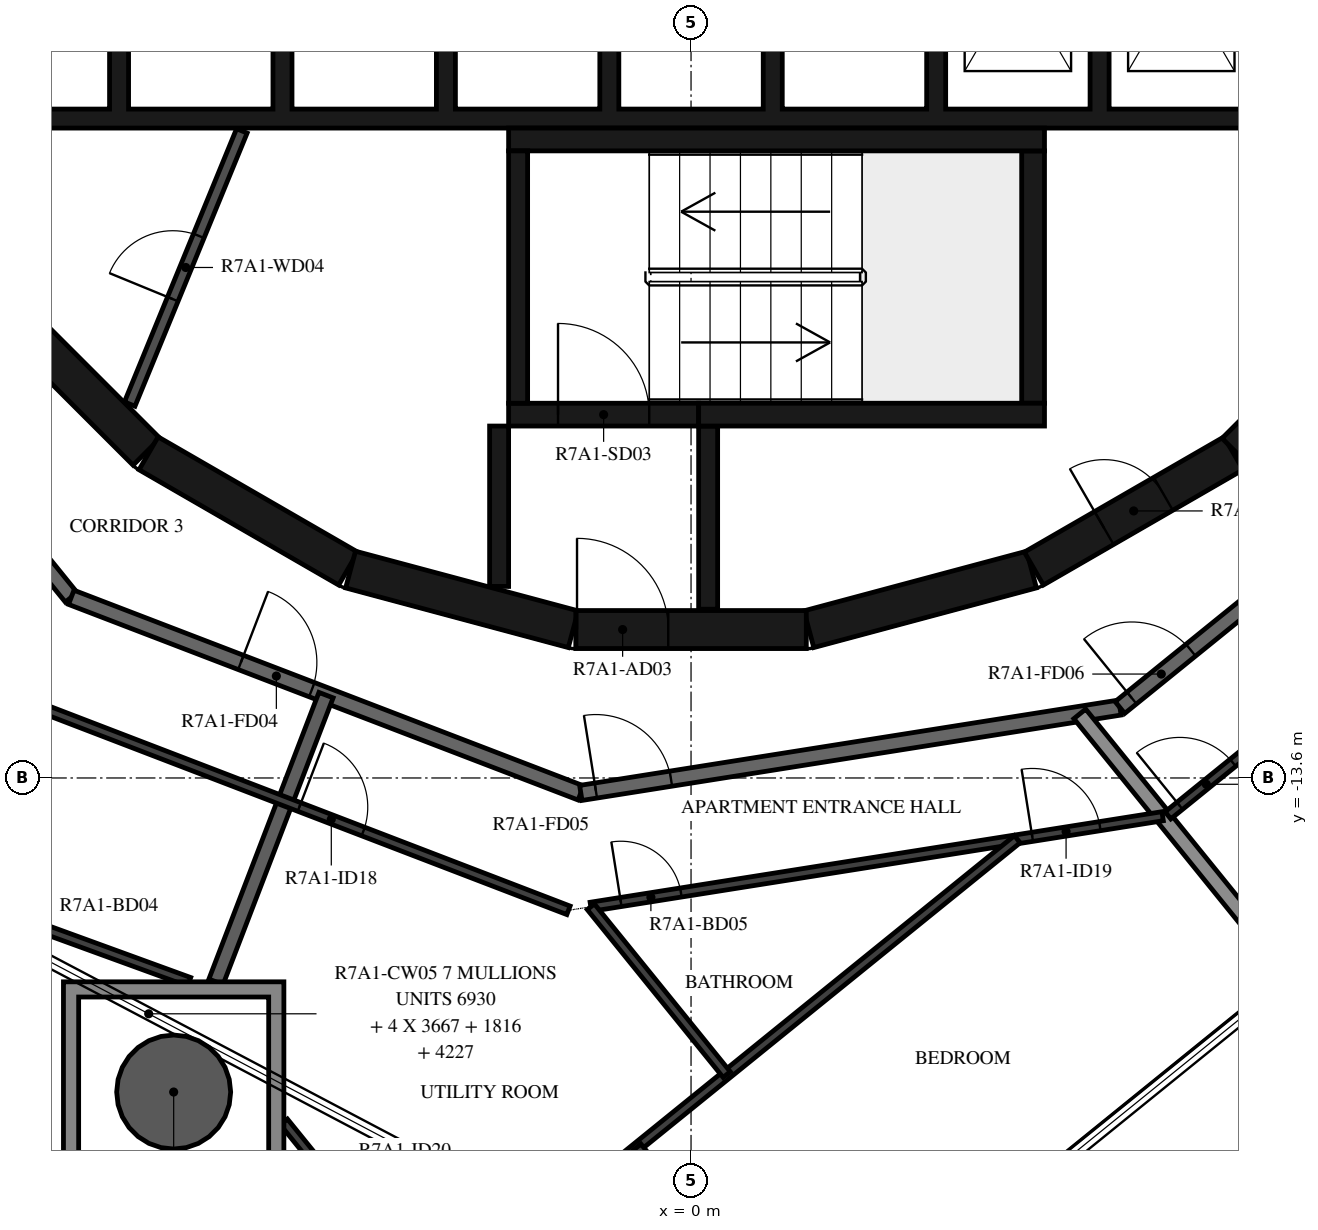
"""IFC4 building model, lengths in metres.
Left out: names, types, materials, properties, quantities, classifications, styles, units other than length and angle.
Written with IfcOpenShell. Run it as: python <this file> out.ifc"""

import sys

from ifc_helpers import new_model, si_unit, direction, frame, frame_2d, origin, origin_2d, place, context, subcontext, project, spatial, polyline, rectangle, hollow_circle, outline, extrude, element, fill, save


model = new_model("IFC4")
c1 = context("Model", 3, precision=1e-05, world=origin(), true_north=direction((0.0, 1.0)))
c2 = subcontext(c1, "Body", "Model", "MODEL_VIEW")
j1 = project(units=[si_unit("LENGTHUNIT", "METRE"), si_unit("PLANEANGLEUNIT", "RADIAN")], contexts=[c1])
p1 = place(None, origin())
s1 = spatial("IfcSite", under=j1, at=p1, CompositionType="ELEMENT")
p2 = place(p1, origin())
s2 = spatial("IfcBuilding", under=s1, at=p2, CompositionType="ELEMENT")
p3 = place(p2, frame((0.0, 0.0, 266.9)))
s3 = spatial("IfcBuildingStorey", under=s2, at=p3, CompositionType="ELEMENT", Elevation=266.9)
p4 = place(p3, frame((-6.807, -17.732, -0.38), z_axis=(0.0, 0.0, 1.0), x_axis=(1.0, 0.0, 0.0)))
e1 = element("IfcColumn", 1, at=p4, inside=s3, PredefinedType="COLUMN", context=c2, shape_type="SweptSolid", body=[
    extrude(hollow_circle(Radius=0.75, WallThickness=0.035, at=origin_2d()), origin(), (0.0, 0.0, 1.0), 3.5),
])
p5 = place(p3, frame((1.55, -11.643, 0.0), z_axis=(0.0, 0.0, 1.0), x_axis=(0.965948410781, 0.258734743916, 0.0)))
e2 = element("IfcWall", 2, at=p5, inside=s3, PredefinedType="SHEAR", context=c2, shape_type="SweptSolid", body=[
    extrude(rectangle(XDim=3.033, YDim=0.5, at=frame_2d((1.516, 0.0))), origin(), (0.0, 0.0, 1.0), 3.12),
])
p6 = place(p3, frame((4.51, -10.845, 0.0), z_axis=(0.0, 0.0, 1.0), x_axis=(0.865975092491, 0.500087131594, 0.0)))
e3 = element("IfcWall", 3, at=p6, inside=s3, PredefinedType="SHEAR", context=c2, shape_type="SweptSolid", body=[
    extrude(rectangle(XDim=3.033, YDim=0.5, at=frame_2d((1.516, 0.0))), origin(), (0.0, 0.0, 1.0), 3.12),
])
p7 = place(p6, frame((1.066, 0.0, 0.0)))
e4 = element("IfcOpeningElement", 4, at=p7, cuts=e3, PredefinedType="OPENING", context=c2, shape_type="SweptSolid", body=[
    extrude(rectangle(XDim=0.9, YDim=2.1, at=frame_2d((0.45, 1.05))), frame((0.0, 0.26, 0.0), z_axis=(0.0, -1.0, 0.0), x_axis=(1.0, 0.0, 0.0)), (0.0, 0.0, 1.0), 0.52),
])
for number, where, z_axis, x_axis in (
    (5, (7.164, -9.308, 0.0), (0.0, 0.0, 1.0), (0.707, 0.707, 0.0)),
    (6, (-9.308, -7.164, 0.0), (0.0, 0.0, 1.0), (0.707, -0.707, 0.0)),
):
    element("IfcWall", number, at=place(p3, frame(where, z_axis=z_axis, x_axis=x_axis)), inside=s3, PredefinedType="SHEAR", context=c2, shape_type="SweptSolid", body=[
        extrude(rectangle(XDim=3.032, YDim=0.5, at=frame_2d((1.516, 0.0))), origin(), (0.0, 0.0, 1.0), 3.12),
    ])
for number, where, z_axis, x_axis in (
    (7, (-7.137, -9.329, 0.0), (0.0, 0.0, 1.0), (0.866, -0.5, 0.0)),
    (8, (-4.479, -10.858, 0.0), (0.0, 0.0, 1.0), (0.966, -0.259, 0.0)),
):
    element("IfcWall", number, at=place(p3, frame(where, z_axis=z_axis, x_axis=x_axis)), inside=s3, PredefinedType="SHEAR", context=c2, shape_type="SweptSolid", body=[
        extrude(rectangle(XDim=3.033, YDim=0.5, at=frame_2d((1.516, 0.0))), origin(), (0.0, 0.0, 1.0), 3.12),
    ])
p8 = place(p3, frame((-1.516, -11.647, 0.0), z_axis=(0.0, 0.0, 1.0), x_axis=(1.0, 0.0, 0.0)))
e9 = element("IfcWall", 9, at=p8, inside=s3, PredefinedType="SHEAR", context=c2, shape_type="SweptSolid", body=[
    extrude(rectangle(XDim=3.033, YDim=0.5, at=frame_2d((1.516, 0.0))), origin(), (0.0, 0.0, 1.0), 3.12),
])
p9 = place(p8, frame((0.016, 0.0, 0.0)))
e10 = element("IfcOpeningElement", 10, at=p9, cuts=e9, PredefinedType="OPENING", context=c2, shape_type="SweptSolid", body=[
    extrude(rectangle(XDim=1.2, YDim=2.1, at=frame_2d((0.6, 1.05))), frame((0.0, 0.26, 0.0), z_axis=(0.0, -1.0, 0.0), x_axis=(1.0, 0.0, 0.0)), (0.0, 0.0, 1.0), 0.52),
])
p10 = place(p3, frame((-2.275, -8.67, 0.0), z_axis=(0.0, 0.0, 1.0), x_axis=(0.0, 1.0, 0.0)))
e11 = element("IfcWall", 11, at=p10, inside=s3, PredefinedType="SHEAR", context=c2, shape_type="SweptSolid", body=[
    extrude(rectangle(XDim=3.32, YDim=0.25, at=frame_2d((1.66, 0.0))), origin(), (0.0, 0.0, 1.0), 3.12),
])
p11 = place(p3, frame((-2.4, -5.2, 0.0), z_axis=(0.0, 0.0, 1.0), x_axis=(1.0, 0.0, 0.0)))
e12 = element("IfcWall", 12, at=p11, inside=s3, PredefinedType="SHEAR", context=c2, shape_type="SweptSolid", body=[
    extrude(rectangle(XDim=7.05, YDim=0.3, at=frame_2d((3.525, 0.0))), origin(), (0.0, 0.0, 1.0), 3.12),
])
p12 = place(p3, frame((4.5, -8.67, 0.0), z_axis=(0.0, 0.0, 1.0), x_axis=(0.0, 1.0, 0.0)))
e13 = element("IfcWall", 13, at=p12, inside=s3, PredefinedType="SHEAR", context=c2, shape_type="SweptSolid", body=[
    extrude(rectangle(XDim=3.32, YDim=0.3, at=frame_2d((1.66, 0.0))), origin(), (0.0, 0.0, 1.0), 3.12),
])
p13 = place(p3, frame((0.1, -8.82, 0.0), z_axis=(0.0, 0.0, 1.0), x_axis=(1.0, 0.0, 0.0)))
e14 = element("IfcWall", 14, at=p13, inside=s3, PredefinedType="SHEAR", context=c2, shape_type="SweptSolid", body=[
    extrude(rectangle(XDim=4.55, YDim=0.3, at=frame_2d((2.275, 0.0))), origin(), (0.0, 0.0, 1.0), 3.12),
])
p14 = place(p3, frame((-2.4, -8.82, 0.0), z_axis=(0.0, 0.0, 1.0), x_axis=(1.0, 0.0, 0.0)))
e15 = element("IfcWall", 15, at=p14, inside=s3, PredefinedType="SHEAR", context=c2, shape_type="SweptSolid", body=[
    extrude(rectangle(XDim=2.5, YDim=0.3, at=frame_2d((1.25, 0.0))), origin(), (0.0, 0.0, 1.0), 3.12),
])
p15 = place(p14, frame((0.65, 0.0, 0.0)))
e16 = element("IfcOpeningElement", 16, at=p15, cuts=e15, PredefinedType="OPENING", context=c2, shape_type="SweptSolid", body=[
    extrude(rectangle(XDim=1.2, YDim=2.1, at=frame_2d((0.6, 1.05))), frame((0.0, 0.16, 0.0), z_axis=(0.0, -1.0, 0.0), x_axis=(1.0, 0.0, 0.0)), (0.0, 0.0, 1.0), 0.32),
])
p16 = place(p3, frame((-2.525, -8.97, 0.0), z_axis=(0.0, 0.0, 1.0), x_axis=(0.0, -1.0, 0.0)))
e17 = element("IfcWall", 17, at=p16, inside=s3, PredefinedType="SHEAR", context=c2, shape_type="SweptSolid", body=[
    extrude(rectangle(XDim=2.11, YDim=0.25, at=frame_2d((1.055, 0.0))), origin(), (0.0, 0.0, 1.0), 3.12),
])
p17 = place(p3, frame((0.225, -8.97, 0.0), z_axis=(0.0, 0.0, 1.0), x_axis=(0.0, -1.0, 0.0)))
e18 = element("IfcWall", 18, at=p17, inside=s3, PredefinedType="SHEAR", context=c2, shape_type="SweptSolid", body=[
    extrude(rectangle(XDim=2.41, YDim=0.25, at=frame_2d((1.205, 0.0))), origin(), (0.0, 0.0, 1.0), 3.12),
])
p18 = place(p3, origin())
e19 = element("IfcWall", 19, at=p18, inside=s3, PredefinedType="SHEAR", context=c2, shape_type="SweptSolid", body=[
    extrude(outline(polyline([(9.8, -5.05), (9.8, -4.8), (9.8, -1.9), (9.55, -1.9), (9.55, -4.8), (7.65, -4.8), (7.65, -1.9), (7.4, -1.9), (7.4, -4.8), (5.5, -4.8), (5.5, -1.9), (5.25, -1.9), (5.25, -4.8), (3.35, -4.8), (3.35, -1.9), (3.1, -1.9), (3.1, -4.8), (1.2, -4.8), (1.2, -1.9), (0.95, -1.9), (0.95, -4.8), (-0.95, -4.8), (-0.95, -1.9), (-1.2, -1.9), (-1.2, -4.8), (-3.1, -4.8), (-3.1, -1.9), (-3.35, -1.9), (-3.35, -4.8), (-5.25, -4.8), (-5.25, -1.9), (-5.5, -1.9), (-5.5, -4.8), (-7.4, -4.8), (-7.4, -1.9), (-7.65, -1.9), (-7.65, -4.8), (-9.55, -4.8), (-9.55, -1.9), (-9.8, -1.9), (-9.8, -4.8), (-9.8, -5.05), (9.8, -5.05)])), origin(), (0.0, 0.0, 1.0), 3.12),
])
p19 = place(p3, frame((-7.385, -8.681, 0.0), z_axis=(0.0, 0.0, 1.0), x_axis=(0.379804590409, 0.925066739811, 0.0)))
e20 = element("IfcWall", 20, at=p19, inside=s3, PredefinedType="PARTITIONING", context=c2, shape_type="SweptSolid", body=[
    extrude(rectangle(XDim=3.885, YDim=0.15, at=frame_2d((1.942, 0.0))), origin(), (0.0, 0.0, 1.0), 3.12),
])
p20 = place(p19, frame((1.493, 0.0, 0.0)))
e21 = element("IfcOpeningElement", 21, at=p20, cuts=e20, PredefinedType="OPENING", context=c2, shape_type="SweptSolid", body=[
    extrude(rectangle(XDim=0.9, YDim=2.1, at=frame_2d((0.45, 1.05))), frame((0.0, 0.085, 0.0), z_axis=(0.0, -1.0, 0.0), x_axis=(1.0, 0.0, 0.0)), (0.0, 0.0, 1.0), 0.17),
])
p21 = place(p3, frame((-12.673, -5.643, 0.0), z_axis=(0.0, 0.0, 1.0), x_axis=(0.629302871585, -0.777160148113, 0.0)))
e22 = element("IfcWall", 22, at=p21, inside=s3, PredefinedType="STANDARD", context=c2, shape_type="SweptSolid", body=[
    extrude(rectangle(XDim=7.181, YDim=0.2, at=frame_2d((3.59, 0.0))), origin(), (0.0, 0.0, 1.0), 3.12),
])
p22 = place(p3, frame((-8.154, -11.223, 0.0), z_axis=(0.0, 0.0, 1.0), x_axis=(0.93359073609, -0.358341090983, 0.0)))
e23 = element("IfcWall", 23, at=p22, inside=s3, PredefinedType="STANDARD", context=c2, shape_type="SweptSolid", body=[
    extrude(rectangle(XDim=7.181, YDim=0.2, at=frame_2d((3.59, 0.0))), origin(), (0.0, 0.0, 1.0), 3.12),
])
p23 = place(p22, frame((2.39, 0.0, 0.0)))
e24 = element("IfcOpeningElement", 24, at=p23, cuts=e23, PredefinedType="OPENING", context=c2, shape_type="SweptSolid", body=[
    extrude(rectangle(XDim=1.0, YDim=2.1, at=frame_2d((0.5, 1.05))), frame((0.0, 0.11, 0.0), z_axis=(0.0, -1.0, 0.0), x_axis=(1.0, 0.0, 0.0)), (0.0, 0.0, 1.0), 0.22),
])
p24 = place(p3, frame((-1.45, -13.797, 0.0), z_axis=(0.0, 0.0, 1.0), x_axis=(0.987690361611, 0.156421704315, 0.0)))
e25 = element("IfcWall", 25, at=p24, inside=s3, PredefinedType="STANDARD", context=c2, shape_type="SweptSolid", body=[
    extrude(rectangle(XDim=7.181, YDim=0.2, at=frame_2d((3.591, 0.0))), origin(), (0.0, 0.0, 1.0), 3.12),
])
p25 = place(p24, frame((0.2, 0.0, 0.0)))
e26 = element("IfcOpeningElement", 26, at=p25, cuts=e25, PredefinedType="OPENING", context=c2, shape_type="SweptSolid", body=[
    extrude(rectangle(XDim=1.0, YDim=2.1, at=frame_2d((0.5, 1.05))), frame((0.0, 0.11, 0.0), z_axis=(0.0, -1.0, 0.0), x_axis=(1.0, 0.0, 0.0)), (0.0, 0.0, 1.0), 0.22),
])
p26 = place(p3, frame((5.643, -12.673, 0.0), z_axis=(0.0, 0.0, 1.0), x_axis=(0.777160148113, 0.629302871585, 0.0)))
e27 = element("IfcWall", 27, at=p26, inside=s3, PredefinedType="STANDARD", context=c2, shape_type="SweptSolid", body=[
    extrude(rectangle(XDim=7.181, YDim=0.2, at=frame_2d((3.59, 0.0))), origin(), (0.0, 0.0, 1.0), 3.12),
])
p27 = place(p26, frame((0.2, 0.0, 0.0)))
e28 = element("IfcOpeningElement", 28, at=p27, cuts=e27, PredefinedType="OPENING", context=c2, shape_type="SweptSolid", body=[
    extrude(rectangle(XDim=1.0, YDim=2.1, at=frame_2d((0.5, 1.05))), frame((0.0, 0.11, 0.0), z_axis=(0.0, -1.0, 0.0), x_axis=(1.0, 0.0, 0.0)), (0.0, 0.0, 1.0), 0.22),
])
p28 = place(p3, frame((-6.25, -16.282, 0.0), z_axis=(0.0, 0.0, 1.0), x_axis=(0.358351333512, 0.933586804625, 0.0)))
e29 = element("IfcWall", 29, at=p28, inside=s3, PredefinedType="STANDARD", context=c2, shape_type="SweptSolid", body=[
    extrude(rectangle(XDim=4.04, YDim=0.2, at=frame_2d((2.02, 0.0))), origin(), (0.0, 0.0, 1.0), 3.12),
])
p29 = place(p3, frame((7.861, -16.148, 0.0), z_axis=(0.0, 0.0, 1.0), x_axis=(-0.629330189513, 0.777138026716, 0.0)))
e30 = element("IfcWall", 30, at=p29, inside=s3, PredefinedType="STANDARD", context=c2, shape_type="SweptSolid", body=[
    extrude(rectangle(XDim=4.364, YDim=0.2, at=frame_2d((2.182, 0.0))), origin(), (0.0, 0.0, 1.0), 2.73),
])
p30 = place(p3, frame((-9.067, -12.479, 0.0), z_axis=(0.0, 0.0, 1.0), x_axis=(0.933579449035, -0.358370495911, 0.0)))
e31 = element("IfcWall", 31, at=p30, inside=s3, PredefinedType="PARTITIONING", context=c2, shape_type="SweptSolid", body=[
    extrude(rectangle(XDim=7.985, YDim=0.12, at=frame_2d((3.992, 0.0))), origin(), (0.0, 0.0, 1.0), 3.12),
])
p31 = place(p30, frame((4.192, 0.0, 0.0)))
e32 = element("IfcOpeningElement", 32, at=p31, cuts=e31, PredefinedType="OPENING", context=c2, shape_type="SweptSolid", body=[
    extrude(rectangle(XDim=0.9, YDim=2.1, at=frame_2d((0.45, 1.05))), frame((0.0, 0.07, 0.0), z_axis=(0.0, -1.0, 0.0), x_axis=(1.0, 0.0, 0.0)), (0.0, 0.0, 1.0), 0.14),
])
p32 = place(p3, frame((-10.071, -15.019, 0.0), z_axis=(0.0, 0.0, 1.0), x_axis=(0.939648507355, -0.34214131967, 0.0)))
e33 = element("IfcWall", 33, at=p32, inside=s3, PredefinedType="PARTITIONING", context=c2, shape_type="SweptSolid", body=[
    extrude(rectangle(XDim=3.691, YDim=0.12, at=frame_2d((1.846, 0.0))), origin(), (0.0, 0.0, 1.0), 3.12),
])
p33 = place(p32, frame((0.4, 0.0, 0.0)))
e34 = element("IfcOpeningElement", 34, at=p33, cuts=e33, PredefinedType="OPENING", context=c2, shape_type="SweptSolid", body=[
    extrude(rectangle(XDim=0.8, YDim=2.1, at=frame_2d((0.4, 1.05))), frame((0.0, 0.07, 0.0), z_axis=(0.0, -1.0, 0.0), x_axis=(1.0, 0.0, 0.0)), (0.0, 0.0, 1.0), 0.14),
])
p34 = place(p3, frame((-1.318, -15.294, 0.0), z_axis=(0.0, 0.0, 1.0), x_axis=(0.987689040792, 0.156430044108, 0.0)))
e35 = element("IfcWall", 35, at=p34, inside=s3, PredefinedType="PARTITIONING", context=c2, shape_type="SweptSolid", body=[
    extrude(rectangle(XDim=7.616, YDim=0.12, at=frame_2d((3.808, 0.0))), origin(), (0.0, 0.0, 1.0), 3.12),
])
p35 = place(p34, frame((0.4, 0.0, 0.0)))
e36 = element("IfcOpeningElement", 36, at=p35, cuts=e35, PredefinedType="OPENING", context=c2, shape_type="SweptSolid", body=[
    extrude(rectangle(XDim=0.8, YDim=2.1, at=frame_2d((0.4, 1.05))), frame((0.0, 0.07, 0.0), z_axis=(0.0, -1.0, 0.0), x_axis=(1.0, 0.0, 0.0)), (0.0, 0.0, 1.0), 0.14),
])
p36 = place(p34, frame((5.88, 0.0, 0.0)))
e37 = element("IfcOpeningElement", 37, at=p36, cuts=e35, PredefinedType="OPENING", context=c2, shape_type="SweptSolid", body=[
    extrude(rectangle(XDim=0.9, YDim=2.1, at=frame_2d((0.45, 1.05))), frame((0.0, 0.07, 0.0), z_axis=(0.0, -1.0, 0.0), x_axis=(1.0, 0.0, 0.0)), (0.0, 0.0, 1.0), 0.14),
])
p37 = place(p3, frame((-3.354, -20.597, 0.0), z_axis=(0.0, 0.0, 1.0), x_axis=(-0.629352711751, 0.777119787556, 0.0)))
e38 = element("IfcWall", 38, at=p37, inside=s3, PredefinedType="PARTITIONING", context=c2, shape_type="SweptSolid", body=[
    extrude(rectangle(XDim=3.182, YDim=0.12, at=frame_2d((1.591, 0.0))), origin(), (0.0, 0.0, 1.0), 3.12),
])
p38 = place(p37, frame((0.2, 0.0, 0.0)))
e39 = element("IfcOpeningElement", 39, at=p38, cuts=e38, PredefinedType="OPENING", context=c2, shape_type="SweptSolid", body=[
    extrude(rectangle(XDim=0.9, YDim=2.1, at=frame_2d((0.45, 1.05))), frame((0.0, 0.07, 0.0), z_axis=(0.0, -1.0, 0.0), x_axis=(1.0, 0.0, 0.0)), (0.0, 0.0, 1.0), 0.14),
])
p39 = place(p3, frame((-3.875, -21.019, 0.0), z_axis=(0.0, 0.0, 1.0), x_axis=(0.777149096542, 0.629316519523, 0.0)))
e40 = element("IfcWall", 40, at=p39, inside=s3, PredefinedType="PARTITIONING", context=c2, shape_type="SweptSolid", body=[
    extrude(rectangle(XDim=10.508, YDim=0.12, at=frame_2d((5.254, 0.0))), origin(), (0.0, 0.0, 1.0), 3.12),
])
p40 = place(p39, frame((1.23, 0.0, 0.0)))
e41 = element("IfcOpeningElement", 41, at=p40, cuts=e40, PredefinedType="OPENING", context=c2, shape_type="SweptSolid", body=[
    extrude(rectangle(XDim=0.9, YDim=2.1, at=frame_2d((0.45, 1.05))), frame((0.0, 0.07, 0.0), z_axis=(0.0, -1.0, 0.0), x_axis=(1.0, 0.0, 0.0)), (0.0, 0.0, 1.0), 0.14),
])
p41 = place(p3, frame((0.469, -17.502, 0.0), z_axis=(0.0, 0.0, 1.0), x_axis=(-0.629307025607, 0.777156784389, 0.0)))
e42 = element("IfcWall", 42, at=p41, inside=s3, PredefinedType="PARTITIONING", context=c2, shape_type="SweptSolid", body=[
    extrude(rectangle(XDim=2.84, YDim=0.12, at=frame_2d((1.42, 0.0))), origin(), (0.0, 0.0, 1.0), 3.12),
])
p42 = place(p3, frame((1.56, -21.251, 0.0), z_axis=(0.0, 0.0, 1.0), x_axis=(-0.62934843781, 0.7771232488, 0.0)))
e43 = element("IfcWall", 43, at=p42, inside=s3, PredefinedType="PARTITIONING", context=c2, shape_type="SweptSolid", body=[
    extrude(rectangle(XDim=3.6, YDim=0.12, at=frame_2d((1.8, 0.0))), origin(), (0.0, 0.0, 1.0), 2.73),
])
p43 = place(p3, frame((6.274, -14.092, 0.0), z_axis=(0.0, 0.0, 1.0), x_axis=(0.777135206268, 0.62933367237, 0.0)))
e44 = element("IfcWall", 44, at=p43, inside=s3, PredefinedType="PARTITIONING", context=c2, shape_type="SweptSolid", body=[
    extrude(rectangle(XDim=7.985, YDim=0.12, at=frame_2d((3.992, 0.0))), origin(), (0.0, 0.0, 1.0), 3.12),
])
p44 = place(p43, frame((0.2, 0.0, 0.0)))
e45 = element("IfcOpeningElement", 45, at=p44, cuts=e44, PredefinedType="OPENING", context=c2, shape_type="SweptSolid", body=[
    extrude(rectangle(XDim=0.9, YDim=2.1, at=frame_2d((0.45, 1.05))), frame((0.0, 0.07, 0.0), z_axis=(0.0, -1.0, 0.0), x_axis=(1.0, 0.0, 0.0)), (0.0, 0.0, 1.0), 0.14),
])
p45 = place(p3, origin())
e46 = element("IfcWall", 46, at=p45, inside=s3, PredefinedType="STANDARD", context=c2, shape_type="SweptSolid", body=[
    extrude(outline(polyline([(-5.357, -16.282), (-5.357, -19.182), (-8.257, -19.182), (-8.257, -16.282), (-5.357, -16.282)]), holes=[polyline([(-8.057, -18.982), (-5.557, -18.982), (-5.557, -16.482), (-8.057, -16.482), (-8.057, -18.982)])]), origin(), (0.0, 0.0, 1.0), 3.12),
])
p46 = place(p15, origin())
e47 = element("IfcDoor", 47, at=p46, inside=s3, OperationType="SINGLE_SWING_LEFT", PredefinedType="DOOR", context=c2, shape_type="SweptSolid", body=[
    extrude(rectangle(XDim=1.2, YDim=2.1, at=frame_2d((0.6, 1.05))), frame((0.0, 0.025, 0.0), z_axis=(0.0, -1.0, 0.0), x_axis=(1.0, 0.0, 0.0)), (0.0, 0.0, 1.0), 0.05),
])
fill(e16, e47)
p47 = place(p9, origin())
e48 = element("IfcDoor", 48, at=p47, inside=s3, OperationType="SINGLE_SWING_RIGHT", PredefinedType="DOOR", context=c2, shape_type="SweptSolid", body=[
    extrude(rectangle(XDim=1.2, YDim=2.1, at=frame_2d((0.6, 1.05))), frame((0.0, 0.025, 0.0), z_axis=(0.0, -1.0, 0.0), x_axis=(1.0, 0.0, 0.0)), (0.0, 0.0, 1.0), 0.05),
])
fill(e10, e48)
p48 = place(p20, origin())
e49 = element("IfcDoor", 49, at=p48, inside=s3, OperationType="SINGLE_SWING_RIGHT", PredefinedType="DOOR", context=c2, shape_type="SweptSolid", body=[
    extrude(rectangle(XDim=0.9, YDim=2.1, at=frame_2d((0.45, 1.05))), frame((0.0, 0.025, 0.0), z_axis=(0.0, -1.0, 0.0), x_axis=(1.0, 0.0, 0.0)), (0.0, 0.0, 1.0), 0.05),
])
fill(e21, e49)
p49 = place(p7, origin())
e50 = element("IfcDoor", 50, at=p49, inside=s3, OperationType="SINGLE_SWING_LEFT", PredefinedType="DOOR", context=c2, shape_type="SweptSolid", body=[
    extrude(rectangle(XDim=0.9, YDim=2.1, at=frame_2d((0.45, 1.05))), frame((0.0, 0.025, 0.0), z_axis=(0.0, -1.0, 0.0), x_axis=(1.0, 0.0, 0.0)), (0.0, 0.0, 1.0), 0.05),
])
fill(e4, e50)
p50 = place(p23, origin())
e51 = element("IfcDoor", 51, at=p50, inside=s3, OperationType="SINGLE_SWING_RIGHT", PredefinedType="DOOR", context=c2, shape_type="SweptSolid", body=[
    extrude(rectangle(XDim=1.0, YDim=2.1, at=frame_2d((0.5, 1.05))), frame((0.0, 0.025, 0.0), z_axis=(0.0, -1.0, 0.0), x_axis=(1.0, 0.0, 0.0)), (0.0, 0.0, 1.0), 0.05),
])
fill(e24, e51)
p51 = place(p25, origin())
e52 = element("IfcDoor", 52, at=p51, inside=s3, OperationType="SINGLE_SWING_LEFT", PredefinedType="DOOR", context=c2, shape_type="SweptSolid", body=[
    extrude(rectangle(XDim=1.0, YDim=2.1, at=frame_2d((0.5, 1.05))), frame((0.0, 0.025, 0.0), z_axis=(0.0, -1.0, 0.0), x_axis=(1.0, 0.0, 0.0)), (0.0, 0.0, 1.0), 0.05),
])
fill(e26, e52)
p52 = place(p31, origin())
e53 = element("IfcDoor", 53, at=p52, inside=s3, OperationType="SINGLE_SWING_RIGHT", PredefinedType="DOOR", context=c2, shape_type="SweptSolid", body=[
    extrude(rectangle(XDim=0.9, YDim=2.1, at=frame_2d((0.45, 1.05))), frame((0.0, 0.025, 0.0), z_axis=(0.0, -1.0, 0.0), x_axis=(1.0, 0.0, 0.0)), (0.0, 0.0, 1.0), 0.05),
])
fill(e32, e53)
p53 = place(p35, origin())
e54 = element("IfcDoor", 54, at=p53, inside=s3, OperationType="SINGLE_SWING_LEFT", PredefinedType="DOOR", context=c2, shape_type="SweptSolid", body=[
    extrude(rectangle(XDim=0.8, YDim=2.1, at=frame_2d((0.4, 1.05))), frame((0.0, 0.025, 0.0), z_axis=(0.0, -1.0, 0.0), x_axis=(1.0, 0.0, 0.0)), (0.0, 0.0, 1.0), 0.05),
])
fill(e36, e54)
p54 = place(p36, origin())
e55 = element("IfcDoor", 55, at=p54, inside=s3, OperationType="SINGLE_SWING_LEFT", PredefinedType="DOOR", context=c2, shape_type="SweptSolid", body=[
    extrude(rectangle(XDim=0.9, YDim=2.1, at=frame_2d((0.45, 1.05))), frame((0.0, 0.025, 0.0), z_axis=(0.0, -1.0, 0.0), x_axis=(1.0, 0.0, 0.0)), (0.0, 0.0, 1.0), 0.05),
])
fill(e37, e55)
p55 = place(p27, origin())
e56 = element("IfcDoor", 56, at=p55, inside=s3, OperationType="SINGLE_SWING_LEFT", PredefinedType="DOOR", context=c2, shape_type="SweptSolid", body=[
    extrude(rectangle(XDim=1.0, YDim=2.1, at=frame_2d((0.5, 1.05))), frame((0.0, 0.025, 0.0), z_axis=(0.0, -1.0, 0.0), x_axis=(1.0, 0.0, 0.0)), (0.0, 0.0, 1.0), 0.05),
])
fill(e28, e56)
p56 = place(p44, origin())
e57 = element("IfcDoor", 57, at=p56, inside=s3, OperationType="SINGLE_SWING_LEFT", PredefinedType="DOOR", context=c2, shape_type="SweptSolid", body=[
    extrude(rectangle(XDim=0.9, YDim=2.1, at=frame_2d((0.45, 1.05))), frame((0.0, 0.025, 0.0), z_axis=(0.0, -1.0, 0.0), x_axis=(1.0, 0.0, 0.0)), (0.0, 0.0, 1.0), 0.05),
])
fill(e45, e57)
save(model, sys.argv[1])
